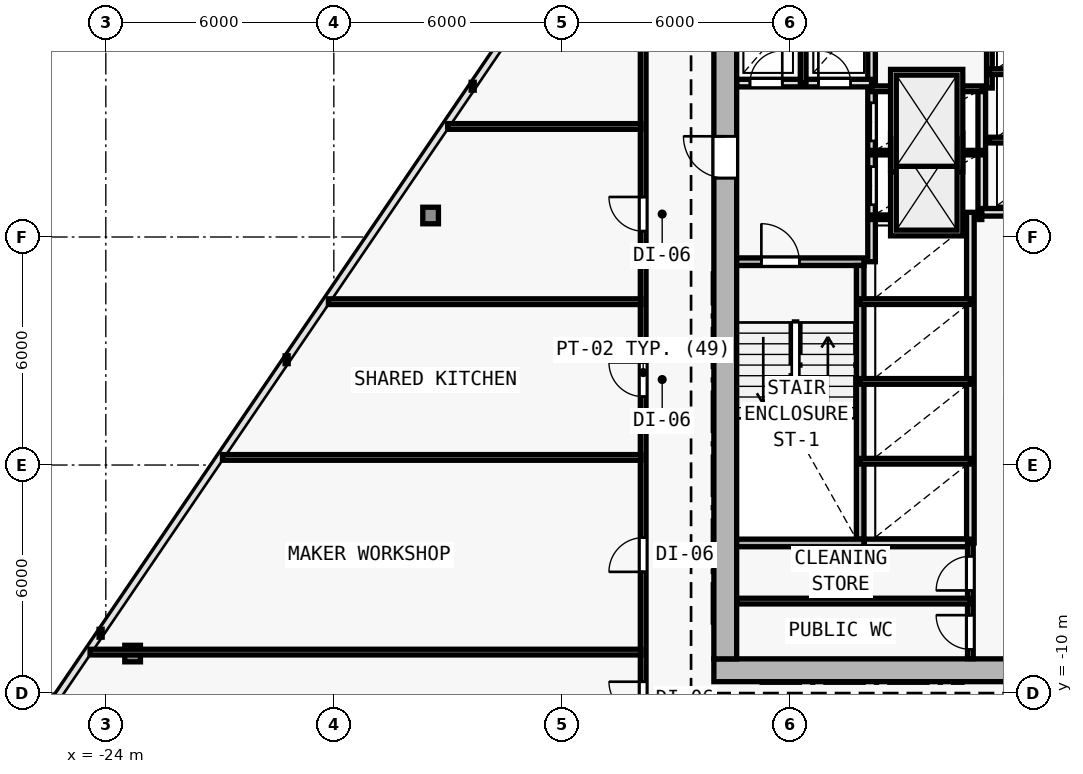
"""IFC4 building model, lengths in metres.
Left out: names, types, materials, properties, quantities, classifications, styles, units other than length and angle.
Written with IfcOpenShell. Run it as: python <this file> out.ifc"""

import sys

from ifc_helpers import new_model, si_unit, direction, frame, frame_2d, origin, origin_2d, place, context, subcontext, project, spatial, rectangle, i_section, extrude, element, fill, save


model = new_model("IFC4")
c1 = context("Model", 3, precision=1e-05, world=origin(), true_north=direction((0.0, 1.0)))
c2 = subcontext(c1, "Body", "Model", "MODEL_VIEW")
j1 = project(units=[si_unit("LENGTHUNIT", "METRE"), si_unit("PLANEANGLEUNIT", "RADIAN")], contexts=[c1])
p1 = place(None, origin())
s1 = spatial("IfcSite", under=j1, at=p1, CompositionType="ELEMENT")
p2 = place(p1, origin())
s2 = spatial("IfcBuilding", under=s1, at=p2, CompositionType="ELEMENT")
p3 = place(p2, frame((0.0, 0.0, 69.6)))
s3 = spatial("IfcBuildingStorey", under=s2, at=p3, CompositionType="ELEMENT", Elevation=69.6)
for number, where, z_axis, x_axis in (
    (1, (-7.7, -9.4, 0.0), (0.0, 0.0, 1.0), (1.0, 0.0, 0.0)),
    (2, (-7.7, 2.0, 0.0), (0.0, 0.0, 1.0), (1.0, 0.0, 0.0)),
):
    element("IfcColumn", number, at=place(p3, frame(where, z_axis=z_axis, x_axis=x_axis)), inside=s3, PredefinedType="COLUMN", context=c2, shape_type="SweptSolid", body=[
        extrude(i_section(OverallWidth=0.416, OverallDepth=0.446, WebThickness=0.025, FlangeThickness=0.04, FilletRadius=0.015, at=origin_2d()), origin(), (0.0, 0.0, 1.0), 3.6),
    ])
p4 = place(p3, frame((-15.454, 2.565, 0.005), z_axis=(0.017070395515, 0.009589345688, 0.99980830465), x_axis=(-0.489766415861, 0.871853690647, 0.0)))
e3 = element("IfcColumn", 3, at=p4, inside=s3, PredefinedType="COLUMN", context=c2, shape_type="SweptSolid", body=[
    extrude(i_section(OverallWidth=0.412, OverallDepth=0.435, WebThickness=0.023, FlangeThickness=0.037, FilletRadius=0.015, at=origin_2d()), origin(), (0.0, 0.0, 1.0), 3.59),
])
p5 = place(p3, frame((-23.295, -8.961, 0.005), z_axis=(0.025222486673, 0.021551289152, 0.999449532544), x_axis=(-0.649609258817, 0.760268249278, 0.0)))
e4 = element("IfcColumn", 4, at=p5, inside=s3, PredefinedType="COLUMN", context=c2, shape_type="SweptSolid", body=[
    extrude(i_section(OverallWidth=0.412, OverallDepth=0.435, WebThickness=0.023, FlangeThickness=0.037, FilletRadius=0.015, at=origin_2d()), origin(), (0.0, 0.0, 1.0), 3.591),
])
p6 = place(p3, frame((-8.0, -9.4, 0.0), z_axis=(0.0, 0.0, 1.0), x_axis=(1.0, 0.0, 0.0)))
e5 = element("IfcWall", 5, at=p6, inside=s3, PredefinedType="SHEAR", context=c2, shape_type="SweptSolid", body=[
    extrude(rectangle(XDim=16.0, YDim=0.6, at=frame_2d((8.0, 0.0))), origin(), (0.0, 0.0, 1.0), 3.28),
])
p7 = place(p6, frame((9.65, 0.0, 0.0)))
e6 = element("IfcOpeningElement", 6, at=p7, cuts=e5, PredefinedType="OPENING", context=c2, shape_type="SweptSolid", body=[
    extrude(rectangle(XDim=1.5, YDim=2.2, at=frame_2d((0.75, 1.1))), frame((0.0, 0.31, 0.0), z_axis=(0.0, -1.0, 0.0), x_axis=(1.0, 0.0, 0.0)), (0.0, 0.0, 1.0), 0.62),
])
p8 = place(p3, frame((-7.7, -9.1, 0.0), z_axis=(0.0, 0.0, 1.0), x_axis=(0.0, 1.0, 0.0)))
e7 = element("IfcWall", 7, at=p8, inside=s3, PredefinedType="SHEAR", context=c2, shape_type="SweptSolid", body=[
    extrude(rectangle(XDim=19.0, YDim=0.6, at=frame_2d((9.5, 0.0))), origin(), (0.0, 0.0, 1.0), 3.28),
])
p9 = place(p8, frame((12.65, 0.0, 0.0)))
e8 = element("IfcOpeningElement", 8, at=p9, cuts=e7, PredefinedType="OPENING", context=c2, shape_type="SweptSolid", body=[
    extrude(rectangle(XDim=1.1, YDim=2.15, at=frame_2d((0.55, 1.075))), frame((0.0, 0.31, 0.0), z_axis=(0.0, -1.0, 0.0), x_axis=(1.0, 0.0, 0.0)), (0.0, 0.0, 1.0), 0.62),
])
p10 = place(p3, frame((-7.4, 1.35, 0.0), z_axis=(0.0, 0.0, 1.0), x_axis=(1.0, 0.0, 0.0)))
e9 = element("IfcWall", 9, at=p10, inside=s3, PredefinedType="SOLIDWALL", context=c2, shape_type="SweptSolid", body=[
    extrude(rectangle(XDim=3.35, YDim=0.2, at=frame_2d((1.675, 0.0))), origin(), (0.0, 0.0, 1.0), 3.28),
])
p11 = place(p10, frame((0.65, 0.0, 0.0)))
e10 = element("IfcOpeningElement", 10, at=p11, cuts=e9, PredefinedType="OPENING", context=c2, shape_type="SweptSolid", body=[
    extrude(rectangle(XDim=1.0, YDim=2.15, at=frame_2d((0.5, 1.075))), frame((0.0, 0.11, 0.0), z_axis=(0.0, -1.0, 0.0), x_axis=(1.0, 0.0, 0.0)), (0.0, 0.0, 1.0), 0.22),
])
p12 = place(p3, frame((-4.15, -5.95, 0.0), z_axis=(0.0, 0.0, 1.0), x_axis=(0.0, 1.0, 0.0)))
e11 = element("IfcWall", 11, at=p12, inside=s3, PredefinedType="SOLIDWALL", context=c2, shape_type="SweptSolid", body=[
    extrude(rectangle(XDim=7.2, YDim=0.2, at=frame_2d((3.6, 0.0))), origin(), (0.0, 0.0, 1.0), 3.28),
])
p13 = place(p3, frame((-3.85, 1.35, 0.0), z_axis=(0.0, 0.0, 1.0), x_axis=(0.0, 1.0, 0.0)))
e12 = element("IfcWall", 12, at=p13, inside=s3, PredefinedType="SOLIDWALL", context=c2, shape_type="SweptSolid", body=[
    extrude(rectangle(XDim=8.545, YDim=0.2, at=frame_2d((4.272, 0.0))), origin(), (0.0, 0.0, 1.0), 3.28),
])
p14 = place(p13, frame((1.5, 0.0, 0.0)))
e13 = element("IfcOpeningElement", 13, at=p14, cuts=e12, PredefinedType="OPENING", context=c2, shape_type="SweptSolid", body=[
    extrude(rectangle(XDim=1.0, YDim=2.15, at=frame_2d((0.5, 1.075))), frame((0.0, 0.11, 0.0), z_axis=(0.0, -1.0, 0.0), x_axis=(1.0, 0.0, 0.0)), (0.0, 0.0, 1.0), 0.22),
])
p15 = place(p13, frame((3.18, 0.0, 0.0)))
e14 = element("IfcOpeningElement", 14, at=p15, cuts=e12, PredefinedType="OPENING", context=c2, shape_type="SweptSolid", body=[
    extrude(rectangle(XDim=1.0, YDim=2.15, at=frame_2d((0.5, 1.075))), frame((0.0, 0.11, 0.0), z_axis=(0.0, -1.0, 0.0), x_axis=(1.0, 0.0, 0.0)), (0.0, 0.0, 1.0), 0.22),
])
p16 = place(p3, frame((-7.395, 6.05, 0.0), z_axis=(0.0, 0.0, 1.0), x_axis=(1.0, 0.0, 0.0)))
e15 = element("IfcWall", 15, at=p16, inside=s3, PredefinedType="SOLIDWALL", context=c2, shape_type="SweptSolid", body=[
    extrude(rectangle(XDim=3.545, YDim=0.2, at=frame_2d((1.772, 0.0))), origin(), (0.0, 0.0, 1.0), 3.28),
])
p17 = place(p16, frame((0.345, 0.0, 0.0)))
e16 = element("IfcOpeningElement", 16, at=p17, cuts=e15, PredefinedType="OPENING", context=c2, shape_type="SweptSolid", body=[
    extrude(rectangle(XDim=0.85, YDim=2.1, at=frame_2d((0.425, 1.05))), frame((0.0, 0.11, 0.0), z_axis=(0.0, -1.0, 0.0), x_axis=(1.0, 0.0, 0.0)), (0.0, 0.0, 1.0), 0.22),
])
p18 = place(p16, frame((2.145, 0.0, 0.0)))
e17 = element("IfcOpeningElement", 17, at=p18, cuts=e15, PredefinedType="OPENING", context=c2, shape_type="SweptSolid", body=[
    extrude(rectangle(XDim=0.85, YDim=2.1, at=frame_2d((0.425, 1.05))), frame((0.0, 0.11, 0.0), z_axis=(0.0, -1.0, 0.0), x_axis=(1.0, 0.0, 0.0)), (0.0, 0.0, 1.0), 0.22),
])
p19 = place(p3, frame((-5.65, 6.05, 0.0), z_axis=(0.0, 0.0, 1.0), x_axis=(0.0, 1.0, 0.0)))
e18 = element("IfcWall", 18, at=p19, inside=s3, PredefinedType="PARTITIONING", context=c2, shape_type="SweptSolid", body=[
    extrude(rectangle(XDim=2.05, YDim=0.15, at=frame_2d((1.025, 0.0))), origin(), (0.0, 0.0, 1.0), 3.28),
])
p20 = place(p3, frame((-0.95, 2.65, 0.0), z_axis=(0.0, 0.0, 1.0), x_axis=(0.0, 1.0, 0.0)))
e19 = element("IfcWall", 19, at=p20, inside=s3, PredefinedType="SOLIDWALL", context=c2, shape_type="SweptSolid", body=[
    extrude(rectangle(XDim=3.27, YDim=0.2, at=frame_2d((1.635, 0.0))), origin(), (0.0, 0.0, 1.0), 3.28),
])
for number, where, z_axis, x_axis in (
    (20, (-3.85, 2.52, 0.0), (0.0, 0.0, 1.0), (1.0, 0.0, 0.0)),
    (21, (-3.85, 4.22, 0.0), (0.0, 0.0, 1.0), (1.0, 0.0, 0.0)),
):
    element("IfcWall", number, at=place(p3, frame(where, z_axis=z_axis, x_axis=x_axis)), inside=s3, PredefinedType="PARTITIONING", context=c2, shape_type="SweptSolid", body=[
        extrude(rectangle(XDim=2.9, YDim=0.12, at=frame_2d((1.45, 0.0))), origin(), (0.0, 0.0, 1.0), 3.28),
    ])
p21 = place(p3, frame((-3.85, 5.9, 0.0), z_axis=(0.0, 0.0, 1.0), x_axis=(1.0, 0.0, 0.0)))
e22 = element("IfcWall", 22, at=p21, inside=s3, PredefinedType="PARTITIONING", context=c2, shape_type="SweptSolid", body=[
    extrude(rectangle(XDim=2.9, YDim=0.15, at=frame_2d((1.45, 0.0))), origin(), (0.0, 0.0, 1.0), 3.28),
])
p22 = place(p3, frame((-1.25, -6.05, 0.0), z_axis=(0.0, 0.0, 1.0), x_axis=(0.0, 1.0, 0.0)))
e23 = element("IfcWall", 23, at=p22, inside=s3, PredefinedType="SOLIDWALL", context=c2, shape_type="SweptSolid", body=[
    extrude(rectangle(XDim=8.7, YDim=0.2, at=frame_2d((4.35, 0.0))), origin(), (0.0, 0.0, 1.0), 3.28),
])
for number, where, z_axis, x_axis in (
    (24, (-4.15, -3.9, 0.0), (0.0, 0.0, 1.0), (1.0, 0.0, 0.0)),
    (25, (-4.15, -1.8, 0.0), (0.0, 0.0, 1.0), (1.0, 0.0, 0.0)),
    (26, (-4.15, 0.3, 0.0), (0.0, 0.0, 1.0), (1.0, 0.0, 0.0)),
):
    element("IfcWall", number, at=place(p3, frame(where, z_axis=z_axis, x_axis=x_axis)), inside=s3, PredefinedType="PARTITIONING", context=c2, shape_type="SweptSolid", body=[
        extrude(rectangle(XDim=2.9, YDim=0.15, at=frame_2d((1.45, 0.0))), origin(), (0.0, 0.0, 1.0), 3.28),
    ])
p23 = place(p3, frame((-0.95, 2.65, 0.0), z_axis=(0.0, 0.0, 1.0), x_axis=(1.0, 0.0, 0.0)))
e27 = element("IfcWall", 27, at=p23, inside=s3, PredefinedType="SOLIDWALL", context=c2, shape_type="SweptSolid", body=[
    extrude(rectangle(XDim=2.9, YDim=0.2, at=frame_2d((1.45, 0.0))), origin(), (0.0, 0.0, 1.0), 3.28),
])
p24 = place(p3, frame((-0.75, 5.92, 0.0), z_axis=(0.0, 0.0, 1.0), x_axis=(0.0, 1.0, 0.0)))
e28 = element("IfcWall", 28, at=p24, inside=s3, PredefinedType="PARTITIONING", context=c2, shape_type="SweptSolid", body=[
    extrude(rectangle(XDim=3.975, YDim=0.15, at=frame_2d((1.988, 0.0))), origin(), (0.0, 0.0, 1.0), 3.28),
])
for number, where, z_axis, x_axis in (
    (29, (-0.75, 4.55, 0.0), (0.0, 0.0, 1.0), (1.0, 0.0, 0.0)),
    (30, (-0.75, 6.35, 0.0), (0.0, 0.0, 1.0), (1.0, 0.0, 0.0)),
):
    element("IfcWall", number, at=place(p3, frame(where, z_axis=z_axis, x_axis=x_axis)), inside=s3, PredefinedType="PARTITIONING", context=c2, shape_type="SweptSolid", body=[
        extrude(rectangle(XDim=2.7, YDim=0.15, at=frame_2d((1.35, 0.0))), origin(), (0.0, 0.0, 1.0), 3.28),
    ])
p25 = place(p3, frame((-7.4, -6.05, 0.0), z_axis=(0.0, 0.0, 1.0), x_axis=(1.0, 0.0, 0.0)))
e31 = element("IfcWall", 31, at=p25, inside=s3, PredefinedType="SOLIDWALL", context=c2, shape_type="SweptSolid", body=[
    extrude(rectangle(XDim=3.35, YDim=0.2, at=frame_2d((1.675, 0.0))), origin(), (0.0, 0.0, 1.0), 3.28),
])
p26 = place(p3, frame((-4.04, -6.05, 0.0), z_axis=(0.0, 0.0, 1.0), x_axis=(1.0, 0.0, 0.0)))
e32 = element("IfcWall", 32, at=p26, inside=s3, PredefinedType="SOLIDWALL", context=c2, shape_type="SweptSolid", body=[
    extrude(rectangle(XDim=2.79, YDim=0.2, at=frame_2d((1.395, 0.0))), origin(), (0.0, 0.0, 1.0), 3.28),
])
p27 = place(p3, frame((-1.25, -9.095, 0.0), z_axis=(0.0, 0.0, 1.0), x_axis=(0.0, 1.0, 0.0)))
e33 = element("IfcWall", 33, at=p27, inside=s3, PredefinedType="PARTITIONING", context=c2, shape_type="SweptSolid", body=[
    extrude(rectangle(XDim=3.045, YDim=0.15, at=frame_2d((1.522, 0.0))), origin(), (0.0, 0.0, 1.0), 3.28),
])
p28 = place(p27, frame((1.795, 0.0, 0.0)))
e34 = element("IfcOpeningElement", 34, at=p28, cuts=e33, PredefinedType="OPENING", context=c2, shape_type="SweptSolid", body=[
    extrude(rectangle(XDim=0.9, YDim=2.1, at=frame_2d((0.45, 1.05))), frame((0.0, 0.085, 0.0), z_axis=(0.0, -1.0, 0.0), x_axis=(1.0, 0.0, 0.0)), (0.0, 0.0, 1.0), 0.17),
])
p29 = place(p27, frame((0.245, 0.0, 0.0)))
e35 = element("IfcOpeningElement", 35, at=p29, cuts=e33, PredefinedType="OPENING", context=c2, shape_type="SweptSolid", body=[
    extrude(rectangle(XDim=0.9, YDim=2.1, at=frame_2d((0.45, 1.05))), frame((0.0, 0.085, 0.0), z_axis=(0.0, -1.0, 0.0), x_axis=(1.0, 0.0, 0.0)), (0.0, 0.0, 1.0), 0.17),
])
p30 = place(p3, frame((-7.395, -7.58, 0.0), z_axis=(0.0, 0.0, 1.0), x_axis=(1.0, 0.0, 0.0)))
e36 = element("IfcWall", 36, at=p30, inside=s3, PredefinedType="PARTITIONING", context=c2, shape_type="SweptSolid", body=[
    extrude(rectangle(XDim=6.145, YDim=0.15, at=frame_2d((3.073, 0.0))), origin(), (0.0, 0.0, 1.0), 3.28),
])
p31 = place(p3, frame((-9.86, -11.56, 0.0), z_axis=(0.0, 0.0, 1.0), x_axis=(0.0, 1.0, 0.0)))
e37 = element("IfcWall", 37, at=p31, inside=s3, PredefinedType="PARTITIONING", context=c2, shape_type="SweptSolid", body=[
    extrude(rectangle(XDim=19.986, YDim=0.15, at=frame_2d((9.993, 0.0))), origin(), (0.0, 0.0, 1.0), 2.539),
])
p32 = place(p31, frame((9.359, 0.0, 0.0)))
e38 = element("IfcOpeningElement", 38, at=p32, cuts=e37, PredefinedType="OPENING", context=c2, shape_type="SweptSolid", body=[
    extrude(rectangle(XDim=0.9, YDim=2.1, at=frame_2d((0.45, 1.05))), frame((0.0, 0.085, 0.0), z_axis=(0.0, -1.0, 0.0), x_axis=(1.0, 0.0, 0.0)), (0.0, 0.0, 1.0), 0.17),
])
p33 = place(p31, frame((4.749, 0.0, 0.0)))
e39 = element("IfcOpeningElement", 39, at=p33, cuts=e37, PredefinedType="OPENING", context=c2, shape_type="SweptSolid", body=[
    extrude(rectangle(XDim=0.9, YDim=2.1, at=frame_2d((0.45, 1.05))), frame((0.0, 0.085, 0.0), z_axis=(0.0, -1.0, 0.0), x_axis=(1.0, 0.0, 0.0)), (0.0, 0.0, 1.0), 0.17),
])
p34 = place(p31, frame((0.958, 0.0, 0.0)))
e40 = element("IfcOpeningElement", 40, at=p34, cuts=e37, PredefinedType="OPENING", context=c2, shape_type="SweptSolid", body=[
    extrude(rectangle(XDim=0.9, YDim=2.1, at=frame_2d((0.45, 1.05))), frame((0.0, 0.085, 0.0), z_axis=(0.0, -1.0, 0.0), x_axis=(1.0, 0.0, 0.0)), (0.0, 0.0, 1.0), 0.17),
])
p35 = place(p31, frame((13.713, 0.0, 0.0)))
e41 = element("IfcOpeningElement", 41, at=p35, cuts=e37, PredefinedType="OPENING", context=c2, shape_type="SweptSolid", body=[
    extrude(rectangle(XDim=0.9, YDim=2.1, at=frame_2d((0.45, 1.05))), frame((0.0, 0.085, 0.0), z_axis=(0.0, -1.0, 0.0), x_axis=(1.0, 0.0, 0.0)), (0.0, 0.0, 1.0), 0.17),
])
p36 = place(p3, frame((-9.92, -8.922, 0.0), z_axis=(0.0, 0.0, 1.0), x_axis=(-1.0, 0.0, 0.0)))
e42 = element("IfcWall", 42, at=p36, inside=s3, PredefinedType="PARTITIONING", context=c2, shape_type="SweptSolid", body=[
    extrude(rectangle(XDim=14.494, YDim=0.15, at=frame_2d((7.247, 0.0))), origin(), (0.0, 0.0, 1.0), 2.539),
])
p37 = place(p3, frame((-9.92, 0.298, 0.0), z_axis=(0.0, 0.0, 1.0), x_axis=(-1.0, 0.0, 0.0)))
e43 = element("IfcWall", 43, at=p37, inside=s3, PredefinedType="PARTITIONING", context=c2, shape_type="SweptSolid", body=[
    extrude(rectangle(XDim=8.222, YDim=0.15, at=frame_2d((4.111, 0.0))), origin(), (0.0, 0.0, 1.0), 2.705),
])
p38 = place(p3, frame((-9.92, -3.8, 0.0), z_axis=(0.0, 0.0, 1.0), x_axis=(-1.0, 0.0, 0.0)))
e44 = element("IfcWall", 44, at=p38, inside=s3, PredefinedType="PARTITIONING", context=c2, shape_type="SweptSolid", body=[
    extrude(rectangle(XDim=11.01, YDim=0.15, at=frame_2d((5.505, 0.0))), origin(), (0.0, 0.0, 1.0), 2.705),
])
p39 = place(p3, frame((-9.92, 4.909, 0.0), z_axis=(0.0, 0.0, 1.0), x_axis=(-1.0, 0.0, 0.0)))
e45 = element("IfcWall", 45, at=p39, inside=s3, PredefinedType="PARTITIONING", context=c2, shape_type="SweptSolid", body=[
    extrude(rectangle(XDim=5.086, YDim=0.15, at=frame_2d((2.543, 0.0))), origin(), (0.0, 0.0, 1.0), 2.655),
])
p40 = place(p9, origin())
e46 = element("IfcDoor", 46, at=p40, inside=s3, OperationType="SINGLE_SWING_RIGHT", PredefinedType="DOOR", context=c2, shape_type="SweptSolid", body=[
    extrude(rectangle(XDim=1.1, YDim=2.15, at=frame_2d((0.55, 1.075))), frame((0.0, 0.025, 0.0), z_axis=(0.0, -1.0, 0.0), x_axis=(1.0, 0.0, 0.0)), (0.0, 0.0, 1.0), 0.05),
])
fill(e8, e46)
p41 = place(p11, origin())
e47 = element("IfcDoor", 47, at=p41, inside=s3, OperationType="SINGLE_SWING_LEFT", PredefinedType="DOOR", context=c2, shape_type="SweptSolid", body=[
    extrude(rectangle(XDim=1.0, YDim=2.15, at=frame_2d((0.5, 1.075))), frame((0.0, 0.025, 0.0), z_axis=(0.0, -1.0, 0.0), x_axis=(1.0, 0.0, 0.0)), (0.0, 0.0, 1.0), 0.05),
])
fill(e10, e47)
p42 = place(p17, origin())
e48 = element("IfcDoor", 48, at=p42, inside=s3, OperationType="SINGLE_SWING_RIGHT", PredefinedType="DOOR", context=c2, shape_type="SweptSolid", body=[
    extrude(rectangle(XDim=0.85, YDim=2.1, at=frame_2d((0.425, 1.05))), frame((0.0, 0.025, 0.0), z_axis=(0.0, -1.0, 0.0), x_axis=(1.0, 0.0, 0.0)), (0.0, 0.0, 1.0), 0.05),
])
fill(e16, e48)
p43 = place(p18, origin())
e49 = element("IfcDoor", 49, at=p43, inside=s3, OperationType="SINGLE_SWING_LEFT", PredefinedType="DOOR", context=c2, shape_type="SweptSolid", body=[
    extrude(rectangle(XDim=0.85, YDim=2.1, at=frame_2d((0.425, 1.05))), frame((0.0, 0.025, 0.0), z_axis=(0.0, -1.0, 0.0), x_axis=(1.0, 0.0, 0.0)), (0.0, 0.0, 1.0), 0.05),
])
fill(e17, e49)
p44 = place(p14, origin())
e50 = element("IfcDoor", 50, at=p44, inside=s3, OperationType="DOUBLE_DOOR_SLIDING", PredefinedType="DOOR", context=c2, shape_type="SweptSolid", body=[
    extrude(rectangle(XDim=1.0, YDim=2.15, at=frame_2d((0.5, 1.075))), frame((0.0, 0.025, 0.0), z_axis=(0.0, -1.0, 0.0), x_axis=(1.0, 0.0, 0.0)), (0.0, 0.0, 1.0), 0.05),
])
fill(e13, e50)
p45 = place(p15, origin())
e51 = element("IfcDoor", 51, at=p45, inside=s3, OperationType="DOUBLE_DOOR_SLIDING", PredefinedType="DOOR", context=c2, shape_type="SweptSolid", body=[
    extrude(rectangle(XDim=1.0, YDim=2.15, at=frame_2d((0.5, 1.075))), frame((0.0, 0.025, 0.0), z_axis=(0.0, -1.0, 0.0), x_axis=(1.0, 0.0, 0.0)), (0.0, 0.0, 1.0), 0.05),
])
fill(e14, e51)
p46 = place(p28, origin())
e52 = element("IfcDoor", 52, at=p46, inside=s3, OperationType="SINGLE_SWING_LEFT", PredefinedType="DOOR", context=c2, shape_type="SweptSolid", body=[
    extrude(rectangle(XDim=0.9, YDim=2.1, at=frame_2d((0.45, 1.05))), frame((0.0, 0.025, 0.0), z_axis=(0.0, -1.0, 0.0), x_axis=(1.0, 0.0, 0.0)), (0.0, 0.0, 1.0), 0.05),
])
fill(e34, e52)
p47 = place(p29, origin())
e53 = element("IfcDoor", 53, at=p47, inside=s3, OperationType="SINGLE_SWING_RIGHT", PredefinedType="DOOR", context=c2, shape_type="SweptSolid", body=[
    extrude(rectangle(XDim=0.9, YDim=2.1, at=frame_2d((0.45, 1.05))), frame((0.0, 0.025, 0.0), z_axis=(0.0, -1.0, 0.0), x_axis=(1.0, 0.0, 0.0)), (0.0, 0.0, 1.0), 0.05),
])
fill(e35, e53)
p48 = place(p32, origin())
e54 = element("IfcDoor", 54, at=p48, inside=s3, OperationType="SINGLE_SWING_RIGHT", PredefinedType="DOOR", context=c2, shape_type="SweptSolid", body=[
    extrude(rectangle(XDim=0.9, YDim=2.1, at=frame_2d((0.45, 1.05))), frame((0.0, 0.025, 0.0), z_axis=(0.0, -1.0, 0.0), x_axis=(1.0, 0.0, 0.0)), (0.0, 0.0, 1.0), 0.05),
])
fill(e38, e54)
p49 = place(p33, origin())
e55 = element("IfcDoor", 55, at=p49, inside=s3, OperationType="SINGLE_SWING_LEFT", PredefinedType="DOOR", context=c2, shape_type="SweptSolid", body=[
    extrude(rectangle(XDim=0.9, YDim=2.1, at=frame_2d((0.45, 1.05))), frame((0.0, 0.025, 0.0), z_axis=(0.0, -1.0, 0.0), x_axis=(1.0, 0.0, 0.0)), (0.0, 0.0, 1.0), 0.05),
])
fill(e39, e55)
p50 = place(p34, origin())
e56 = element("IfcDoor", 56, at=p50, inside=s3, OperationType="SINGLE_SWING_RIGHT", PredefinedType="DOOR", context=c2, shape_type="SweptSolid", body=[
    extrude(rectangle(XDim=0.9, YDim=2.1, at=frame_2d((0.45, 1.05))), frame((0.0, 0.025, 0.0), z_axis=(0.0, -1.0, 0.0), x_axis=(1.0, 0.0, 0.0)), (0.0, 0.0, 1.0), 0.05),
])
fill(e40, e56)
p51 = place(p35, origin())
e57 = element("IfcDoor", 57, at=p51, inside=s3, OperationType="SINGLE_SWING_RIGHT", PredefinedType="DOOR", context=c2, shape_type="SweptSolid", body=[
    extrude(rectangle(XDim=0.9, YDim=2.1, at=frame_2d((0.45, 1.05))), frame((0.0, 0.025, 0.0), z_axis=(0.0, -1.0, 0.0), x_axis=(1.0, 0.0, 0.0)), (0.0, 0.0, 1.0), 0.05),
])
fill(e41, e57)
save(model, sys.argv[1])
